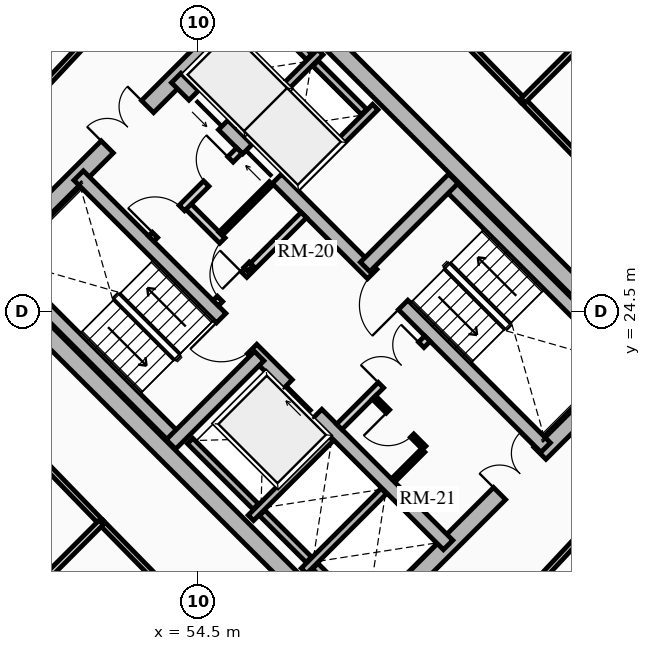
"""IFC4 building model, lengths in metres.
Left out: names, types, materials, properties, quantities, classifications, styles, units other than length and angle.
Written with IfcOpenShell. Run it as: python <this file> out.ifc"""

import sys

from ifc_helpers import new_model, si_unit, direction, frame, frame_2d, origin, place, context, subcontext, project, spatial, rectangle, extrude, source, transform, mapped, element, fill, save


model = new_model("IFC4")
c1 = context("Model", 3, precision=1e-05, world=origin(), true_north=direction((0.0, 1.0)))
c2 = subcontext(c1, "Body", "Model", "MODEL_VIEW")
j1 = project(units=[si_unit("LENGTHUNIT", "METRE"), si_unit("PLANEANGLEUNIT", "RADIAN")], contexts=[c1])
p1 = place(None, origin())
s1 = spatial("IfcSite", under=j1, at=p1, CompositionType="ELEMENT")
p2 = place(p1, origin())
s2 = spatial("IfcBuilding", under=s1, at=p2, CompositionType="ELEMENT")
p3 = place(p2, frame((0.0, 0.0, 90.52)))
s3 = spatial("IfcBuildingStorey", under=s2, at=p3, CompositionType="ELEMENT", Elevation=90.52)
for number, where, z_axis, x_axis in (
    (1, (58.737, 15.697, 0.0), (0.0, 0.0, 1.0), (-0.707, 0.707, 0.0)),
    (2, (66.303, 23.263, 0.0), (0.0, 0.0, 1.0), (-0.707, 0.707, 0.0)),
):
    element("IfcWall", number, at=place(p3, frame(where, z_axis=z_axis, x_axis=x_axis)), inside=s3, PredefinedType="SHEAR", context=c2, shape_type="SweptSolid", body=[
        extrude(rectangle(XDim=14.2, YDim=0.45, at=frame_2d((7.1, 0.0))), origin(), (0.0, 0.0, 1.0), 2.91),
    ])
p4 = place(p3, frame((58.578, 15.856, 0.0), z_axis=(0.0, 0.0, 1.0), x_axis=(0.707106781187, 0.707106781187, 0.0)))
e3 = element("IfcWall", 3, at=p4, inside=s3, PredefinedType="SHEAR", context=c2, shape_type="SweptSolid", body=[
    extrude(rectangle(XDim=10.7, YDim=0.45, at=frame_2d((5.35, 0.0))), origin(), (0.0, 0.0, 1.0), 2.91),
])
m1 = source(origin(), c2, "Body", "SweptSolid", [
    extrude(rectangle(XDim=1.5, YDim=2.02, at=frame_2d((0.75, 1.01))), frame((0.0, 0.235, 0.0), z_axis=(0.0, -1.0, 0.0), x_axis=(1.0, 0.0, 0.0)), (0.0, 0.0, 1.0), 0.47),
])
p5 = place(p4, frame((5.45, 0.0, 0.0)))
e4 = element("IfcOpeningElement", 4, at=p5, cuts=e3, PredefinedType="OPENING", context=c2, shape_type="MappedRepresentation", body=[
    mapped(m1, transform((0.0, 0.0, 0.0), x_axis=(1.0, 0.0, 0.0), y_axis=(0.0, 1.0, 0.0), z_axis=(0.0, 0.0, 1.0), scale=1.0)),
])
p6 = place(p3, frame((48.856, 25.578, 0.0), z_axis=(0.0, 0.0, 1.0), x_axis=(0.707106781187, 0.707106781187, 0.0)))
e5 = element("IfcWall", 5, at=p6, inside=s3, PredefinedType="SHEAR", context=c2, shape_type="SweptSolid", body=[
    extrude(rectangle(XDim=10.7, YDim=0.45, at=frame_2d((5.35, 0.0))), origin(), (0.0, 0.0, 1.0), 2.91),
])
p7 = place(p6, frame((4.6, 0.0, 0.0)))
e6 = element("IfcOpeningElement", 6, at=p7, cuts=e5, PredefinedType="OPENING", context=c2, shape_type="MappedRepresentation", body=[
    mapped(m1, transform((0.0, 0.0, 0.0), x_axis=(1.0, 0.0, 0.0), y_axis=(0.0, 1.0, 0.0), z_axis=(0.0, 0.0, 1.0), scale=1.0)),
])
p8 = place(p3, frame((61.078, 18.355, 0.0), z_axis=(0.0, 0.0, 1.0), x_axis=(-0.707106781187, 0.707106781187, 0.0)))
e7 = element("IfcWall", 7, at=p8, inside=s3, PredefinedType="SHEAR", context=c2, shape_type="SweptSolid", body=[
    extrude(rectangle(XDim=13.75, YDim=0.35, at=frame_2d((6.875, 0.0))), origin(), (0.0, 0.0, 1.0), 2.91),
])
m2 = source(origin(), c2, "Body", "SweptSolid", [
    extrude(rectangle(XDim=1.1, YDim=2.015, at=frame_2d((0.55, 1.007))), frame((0.0, 0.185, 0.0), z_axis=(0.0, -1.0, 0.0), x_axis=(1.0, 0.0, 0.0)), (0.0, 0.0, 1.0), 0.37),
])
p9 = place(p8, frame((4.875, 0.0, 0.0)))
e8 = element("IfcOpeningElement", 8, at=p9, cuts=e7, PredefinedType="OPENING", context=c2, shape_type="MappedRepresentation", body=[
    mapped(m2, transform((0.0, 0.0, 0.0), x_axis=(1.0, 0.0, 0.0), y_axis=(0.0, 1.0, 0.0), z_axis=(0.0, 0.0, 1.0), scale=1.0)),
])
m3 = source(origin(), c2, "Body", "SweptSolid", [
    extrude(rectangle(XDim=1.15, YDim=2.02, at=frame_2d((0.575, 1.01))), frame((0.0, 0.185, 0.0), z_axis=(0.0, -1.0, 0.0), x_axis=(1.0, 0.0, 0.0)), (0.0, 0.0, 1.0), 0.37),
])
p10 = place(p8, frame((7.295, 0.0, 0.0)))
e9 = element("IfcOpeningElement", 9, at=p10, cuts=e7, PredefinedType="OPENING", context=c2, shape_type="MappedRepresentation", body=[
    mapped(m3, transform((0.0, 0.0, 0.0), x_axis=(1.0, 0.0, 0.0), y_axis=(0.0, 1.0, 0.0), z_axis=(0.0, 0.0, 1.0), scale=1.0)),
])
p11 = place(p3, frame((63.645, 20.922, 0.0), z_axis=(0.0, 0.0, 1.0), x_axis=(-0.707106781187, 0.707106781187, 0.0)))
e10 = element("IfcWall", 10, at=p11, inside=s3, PredefinedType="SHEAR", context=c2, shape_type="SweptSolid", body=[
    extrude(rectangle(XDim=13.75, YDim=0.35, at=frame_2d((6.875, 0.0))), origin(), (0.0, 0.0, 1.0), 2.91),
])
p12 = place(p11, frame((10.0, 0.0, 0.0)))
e11 = element("IfcOpeningElement", 11, at=p12, cuts=e10, PredefinedType="OPENING", context=c2, shape_type="MappedRepresentation", body=[
    mapped(m2, transform((0.0, 0.0, 0.0), x_axis=(1.0, 0.0, 0.0), y_axis=(0.0, 1.0, 0.0), z_axis=(0.0, 0.0, 1.0), scale=1.0)),
])
p13 = place(p11, frame((12.0, 0.0, 0.0)))
e12 = element("IfcOpeningElement", 12, at=p13, cuts=e10, PredefinedType="OPENING", context=c2, shape_type="MappedRepresentation", body=[
    mapped(m2, transform((0.0, 0.0, 0.0), x_axis=(1.0, 0.0, 0.0), y_axis=(0.0, 1.0, 0.0), z_axis=(0.0, 0.0, 1.0), scale=1.0)),
])
p14 = place(p11, frame((5.305, 0.0, 0.0)))
e13 = element("IfcOpeningElement", 13, at=p14, cuts=e10, PredefinedType="OPENING", context=c2, shape_type="MappedRepresentation", body=[
    mapped(m3, transform((0.0, 0.0, 0.0), x_axis=(1.0, 0.0, 0.0), y_axis=(0.0, 1.0, 0.0), z_axis=(0.0, 0.0, 1.0), scale=1.0)),
])
p15 = place(p3, frame((53.922, 21.141, 0.0), z_axis=(0.0, 0.0, 1.0), x_axis=(-0.707088616009, 0.707124945897, 0.0)))
e14 = element("IfcWall", 14, at=p15, inside=s3, PredefinedType="SHEAR", context=c2, shape_type="SweptSolid", body=[
    extrude(rectangle(XDim=6.72, YDim=0.35, at=frame_2d((3.36, 0.0))), origin(), (0.0, 0.0, 1.0), 2.91),
])
p16 = place(p3, frame((53.784, 21.003, 0.0), z_axis=(0.0, 0.0, 1.0), x_axis=(0.707106781187, 0.707106781187, 0.0)))
e15 = element("IfcWall", 15, at=p16, inside=s3, PredefinedType="SHEAR", context=c2, shape_type="SweptSolid", body=[
    extrude(rectangle(XDim=3.285, YDim=0.35, at=frame_2d((1.643, 0.0))), origin(), (0.0, 0.0, 1.0), 2.91),
])
p17 = place(p3, frame((65.83, 23.107, 0.0), z_axis=(0.0, 0.0, 1.0), x_axis=(-0.707088616009, 0.707124945897, 0.0)))
e16 = element("IfcWall", 16, at=p17, inside=s3, PredefinedType="SHEAR", context=c2, shape_type="SweptSolid", body=[
    extrude(rectangle(XDim=6.72, YDim=0.35, at=frame_2d((3.36, 0.0))), origin(), (0.0, 0.0, 1.0), 2.91),
])
p18 = place(p3, frame((58.893, 25.674, 0.0), z_axis=(0.0, 0.0, 1.0), x_axis=(0.707106781187, 0.707106781187, 0.0)))
e17 = element("IfcWall", 17, at=p18, inside=s3, PredefinedType="SHEAR", context=c2, shape_type="SweptSolid", body=[
    extrude(rectangle(XDim=3.285, YDim=0.35, at=frame_2d((1.643, 0.0))), origin(), (0.0, 0.0, 1.0), 2.91),
])
p19 = place(p3, frame((55.888, 19.069, 0.0), z_axis=(0.0, 0.0, 1.0), x_axis=(0.707106781187, 0.707106781187, 0.0)))
e18 = element("IfcWall", 18, at=p19, inside=s3, PredefinedType="SHEAR", context=c2, shape_type="SweptSolid", body=[
    extrude(rectangle(XDim=2.97, YDim=0.2, at=frame_2d((1.485, 0.0))), origin(), (0.0, 0.0, 1.0), 2.91),
])
p20 = place(p3, frame((56.015, 19.366, 0.0), z_axis=(0.0, 0.0, 1.0), x_axis=(-0.707106781187, 0.707106781187, 0.0)))
e19 = element("IfcWall", 19, at=p20, inside=s3, PredefinedType="SHEAR", context=c2, shape_type="SweptSolid", body=[
    extrude(rectangle(XDim=2.44, YDim=0.2, at=frame_2d((1.22, 0.0))), origin(), (0.0, 0.0, 1.0), 2.91),
])
p21 = place(p3, frame((57.284, 17.673, 0.0), z_axis=(0.0, 0.0, 1.0), x_axis=(0.707147878904, 0.70706568108, 0.0)))
e20 = element("IfcWall", 20, at=p21, inside=s3, PredefinedType="SHEAR", context=c2, shape_type="SweptSolid", body=[
    extrude(rectangle(XDim=2.97, YDim=0.2, at=frame_2d((1.485, 0.0))), origin(), (0.0, 0.0, 1.0), 2.91),
])
p22 = place(p3, frame((57.412, 17.97, 0.0), z_axis=(0.0, 0.0, 1.0), x_axis=(-0.707106781187, 0.707106781187, 0.0)))
e21 = element("IfcWall", 21, at=p22, inside=s3, PredefinedType="SHEAR", context=c2, shape_type="SweptSolid", body=[
    extrude(rectangle(XDim=1.735, YDim=0.2, at=frame_2d((0.867, 0.0))), origin(), (0.0, 0.0, 1.0), 2.91),
])
p23 = place(p3, frame((58.737, 16.644, 0.0), z_axis=(0.0, 0.0, 1.0), x_axis=(-0.707032117043, 0.707181437447, 0.0)))
e22 = element("IfcWall", 22, at=p23, inside=s3, PredefinedType="SHEAR", context=c2, shape_type="SweptSolid", body=[
    extrude(rectangle(XDim=1.635, YDim=0.2, at=frame_2d((0.817, 0.0))), origin(), (0.0, 0.0, 1.0), 2.91),
])
p24 = place(p3, frame((57.062, 27.781, 0.0), z_axis=(0.0, 0.0, 1.0), x_axis=(0.707106781187, 0.707106781187, 0.0)))
e23 = element("IfcWall", 23, at=p24, inside=s3, PredefinedType="SHEAR", context=c2, shape_type="SweptSolid", body=[
    extrude(rectangle(XDim=2.97, YDim=0.2, at=frame_2d((1.485, 0.0))), origin(), (0.0, 0.0, 1.0), 2.91),
])
p25 = place(p3, frame((55.615, 29.227, 0.0), z_axis=(0.0, 0.0, 1.0), x_axis=(0.707147878904, 0.70706568108, 0.0)))
e24 = element("IfcWall", 24, at=p25, inside=s3, PredefinedType="SHEAR", context=c2, shape_type="SweptSolid", body=[
    extrude(rectangle(XDim=2.97, YDim=0.2, at=frame_2d((1.485, 0.0))), origin(), (0.0, 0.0, 1.0), 2.91),
])
p26 = place(p3, frame((58.865, 29.754, 0.0), z_axis=(0.0, 0.0, 1.0), x_axis=(-0.707174411312, 0.707039144592, 0.0)))
e25 = element("IfcWall", 25, at=p26, inside=s3, PredefinedType="SHEAR", context=c2, shape_type="SweptSolid", body=[
    extrude(rectangle(XDim=1.805, YDim=0.2, at=frame_2d((0.902, 0.0))), origin(), (0.0, 0.0, 1.0), 2.91),
])
p27 = place(p3, frame((57.419, 31.2, 0.0), z_axis=(0.0, 0.0, 1.0), x_axis=(-0.707032117043, 0.707181437447, 0.0)))
e26 = element("IfcWall", 26, at=p27, inside=s3, PredefinedType="SHEAR", context=c2, shape_type="SweptSolid", body=[
    extrude(rectangle(XDim=1.635, YDim=0.2, at=frame_2d((0.817, 0.0))), origin(), (0.0, 0.0, 1.0), 2.91),
])
p28 = place(p3, frame((58.214, 21.467, 0.0), z_axis=(0.0, 0.0, 1.0), x_axis=(0.707106781187, 0.707106781187, 0.0)))
e27 = element("IfcWall", 27, at=p28, inside=s3, PredefinedType="PARTITIONING", context=c2, shape_type="SweptSolid", body=[
    extrude(rectangle(XDim=3.28, YDim=0.2, at=frame_2d((1.64, 0.0))), origin(), (0.0, 0.0, 1.0), 2.655),
])
m4 = source(origin(), c2, "Body", "SweptSolid", [
    extrude(rectangle(XDim=1.5, YDim=2.02, at=frame_2d((0.75, 1.01))), frame((0.0, 0.11, 0.0), z_axis=(0.0, -1.0, 0.0), x_axis=(1.0, 0.0, 0.0)), (0.0, 0.0, 1.0), 0.22),
])
p29 = place(p28, frame((1.55, 0.0, 0.0)))
e28 = element("IfcOpeningElement", 28, at=p29, cuts=e27, PredefinedType="OPENING", context=c2, shape_type="MappedRepresentation", body=[
    mapped(m4, transform((0.0, 0.0, 0.0), x_axis=(1.0, 0.0, 0.0), y_axis=(0.0, 1.0, 0.0), z_axis=(0.0, 0.0, 1.0), scale=1.0)),
])
p30 = place(p3, frame((54.961, 24.719, 0.0), z_axis=(0.0, 0.0, 1.0), x_axis=(0.707106781187, 0.707106781187, 0.0)))
e29 = element("IfcWall", 29, at=p30, inside=s3, PredefinedType="PARTITIONING", context=c2, shape_type="SweptSolid", body=[
    extrude(rectangle(XDim=3.28, YDim=0.2, at=frame_2d((1.64, 0.0))), origin(), (0.0, 0.0, 1.0), 2.655),
])
m5 = source(origin(), c2, "Body", "SweptSolid", [
    extrude(rectangle(XDim=0.9, YDim=2.005, at=frame_2d((0.45, 1.002))), frame((0.0, 0.11, 0.0), z_axis=(0.0, -1.0, 0.0), x_axis=(1.0, 0.0, 0.0)), (0.0, 0.0, 1.0), 0.22),
])
p31 = place(p30, frame((0.16, 0.0, 0.0)))
e30 = element("IfcOpeningElement", 30, at=p31, cuts=e29, PredefinedType="OPENING", context=c2, shape_type="MappedRepresentation", body=[
    mapped(m5, transform((0.0, 0.0, 0.0), x_axis=(1.0, 0.0, 0.0), y_axis=(0.0, 1.0, 0.0), z_axis=(0.0, 0.0, 1.0), scale=1.0)),
])
p32 = place(p3, frame((55.874, 25.631, 0.0), z_axis=(0.0, 0.0, 1.0), x_axis=(-0.707157639372, 0.707055919343, 0.0)))
e31 = element("IfcWall", 31, at=p32, inside=s3, PredefinedType="PARTITIONING", context=c2, shape_type="SweptSolid", body=[
    extrude(rectangle(XDim=2.4, YDim=0.2, at=frame_2d((1.2, 0.0))), origin(), (0.0, 0.0, 1.0), 2.655),
])
p33 = place(p32, frame((0.14, 0.0, 0.0)))
e32 = element("IfcOpeningElement", 32, at=p33, cuts=e31, PredefinedType="OPENING", context=c2, shape_type="MappedRepresentation", body=[
    mapped(m5, transform((0.0, 0.0, 0.0), x_axis=(1.0, 0.0, 0.0), y_axis=(0.0, 1.0, 0.0), z_axis=(0.0, 0.0, 1.0), scale=1.0)),
])
p34 = place(p3, frame((53.264, 26.416, 0.0), z_axis=(0.0, 0.0, 1.0), x_axis=(0.707106781187, 0.707106781187, 0.0)))
e33 = element("IfcWall", 33, at=p34, inside=s3, PredefinedType="PARTITIONING", context=c2, shape_type="SweptSolid", body=[
    extrude(rectangle(XDim=3.28, YDim=0.2, at=frame_2d((1.64, 0.0))), origin(), (0.0, 0.0, 1.0), 2.655),
])
m6 = source(origin(), c2, "Body", "SweptSolid", [
    extrude(rectangle(XDim=1.0, YDim=2.015, at=frame_2d((0.5, 1.007))), frame((0.0, 0.11, 0.0), z_axis=(0.0, -1.0, 0.0), x_axis=(1.0, 0.0, 0.0)), (0.0, 0.0, 1.0), 0.22),
])
p35 = place(p34, frame((0.14, 0.0, 0.0)))
e34 = element("IfcOpeningElement", 34, at=p35, cuts=e33, PredefinedType="OPENING", context=c2, shape_type="MappedRepresentation", body=[
    mapped(m6, transform((0.0, 0.0, 0.0), x_axis=(1.0, 0.0, 0.0), y_axis=(0.0, 1.0, 0.0), z_axis=(0.0, 0.0, 1.0), scale=1.0)),
])
p36 = place(p34, frame((2.05, 0.0, 0.0)))
e35 = element("IfcOpeningElement", 35, at=p36, cuts=e33, PredefinedType="OPENING", context=c2, shape_type="MappedRepresentation", body=[
    mapped(m5, transform((0.0, 0.0, 0.0), x_axis=(1.0, 0.0, 0.0), y_axis=(0.0, 1.0, 0.0), z_axis=(0.0, 0.0, 1.0), scale=1.0)),
])
p37 = place(p3, frame((60.448, 20.915, 0.0), z_axis=(0.0, 0.0, 1.0), x_axis=(-0.707106781187, 0.707106781187, 0.0)))
e36 = element("IfcWall", 36, at=p37, inside=s3, PredefinedType="PARTITIONING", context=c2, shape_type="SweptSolid", body=[
    extrude(rectangle(XDim=1.87, YDim=0.125, at=frame_2d((0.935, 0.0))), origin(), (0.0, 0.0, 1.0), 2.655),
])
m7 = source(origin(), c2, "Body", "SweptSolid", [
    extrude(rectangle(XDim=0.9, YDim=2.005, at=frame_2d((0.45, 1.002))), frame((0.0, 0.073, 0.0), z_axis=(0.0, -1.0, 0.0), x_axis=(1.0, 0.0, 0.0)), (0.0, 0.0, 1.0), 0.145),
])
p38 = place(p37, frame((0.45, 0.0, 0.0)))
e37 = element("IfcOpeningElement", 37, at=p38, cuts=e36, PredefinedType="OPENING", context=c2, shape_type="MappedRepresentation", body=[
    mapped(m7, transform((0.0, 0.0, 0.0), x_axis=(1.0, 0.0, 0.0), y_axis=(0.0, 1.0, 0.0), z_axis=(0.0, 0.0, 1.0), scale=1.0)),
])
p39 = place(p3, frame((59.643, 20.066, 0.0), z_axis=(0.0, 0.0, 1.0), x_axis=(0.707106781187, 0.707106781187, 0.0)))
e38 = element("IfcWall", 38, at=p39, inside=s3, PredefinedType="PARTITIONING", context=c2, shape_type="SweptSolid", body=[
    extrude(rectangle(XDim=1.1, YDim=0.125, at=frame_2d((0.55, 0.0))), origin(), (0.0, 0.0, 1.0), 2.655),
])
p40 = place(p3, frame((55.089, 26.543, 0.0), z_axis=(0.0, 0.0, 1.0), x_axis=(0.707106781187, 0.707106781187, 0.0)))
e39 = element("IfcWall", 39, at=p40, inside=s3, PredefinedType="PARTITIONING", context=c2, shape_type="SweptSolid", body=[
    extrude(rectangle(XDim=1.88, YDim=0.125, at=frame_2d((0.94, 0.0))), origin(), (0.0, 0.0, 1.0), 2.655),
])
p41 = place(p3, frame((63.051, 30.051, 0.0), z_axis=(0.0, 0.0, 1.0), x_axis=(-0.698846622234, 0.715271555839, 0.0)))
e40 = element("IfcWall", 40, at=p41, inside=s3, PredefinedType="PARTITIONING", context=c2, shape_type="SweptSolid", body=[
    extrude(rectangle(XDim=6.05, YDim=0.15, at=frame_2d((3.025, 0.0))), origin(), (0.0, 0.0, 1.0), 2.225),
])
p42 = place(p3, frame((52.107, 32.202, 0.0), z_axis=(0.0, 0.0, 1.0), x_axis=(-0.682605209028, -0.730787334734, 0.0)))
e41 = element("IfcWall", 41, at=p42, inside=s3, PredefinedType="PARTITIONING", context=c2, shape_type="SweptSolid", body=[
    extrude(rectangle(XDim=6.486, YDim=0.15, at=frame_2d((3.243, 0.0))), origin(), (0.0, 0.0, 1.0), 2.225),
])
p43 = place(p3, frame((47.786, 23.242, 0.0), z_axis=(0.0, 0.0, 1.0), x_axis=(0.696183456981, -0.717863910659, 0.0)))
e42 = element("IfcWall", 42, at=p43, inside=s3, PredefinedType="PARTITIONING", context=c2, shape_type="SweptSolid", body=[
    extrude(rectangle(XDim=5.979, YDim=0.15, at=frame_2d((2.99, 0.0))), origin(), (0.0, 0.0, 1.0), 2.655),
])
p44 = place(p3, frame((51.949, 18.949, 0.0), z_axis=(0.0, 0.0, 1.0), x_axis=(0.699801520154, -0.714337337951, 0.0)))
e43 = element("IfcWall", 43, at=p44, inside=s3, PredefinedType="PARTITIONING", context=c2, shape_type="SweptSolid", body=[
    extrude(rectangle(XDim=6.097, YDim=0.15, at=frame_2d((3.048, 0.0))), origin(), (0.0, 0.0, 1.0), 2.225),
])
p45 = place(p3, frame((62.839, 16.745, 0.0), z_axis=(0.0, 0.0, 1.0), x_axis=(0.682386779427, 0.73099130177, 0.0)))
e44 = element("IfcWall", 44, at=p45, inside=s3, PredefinedType="PARTITIONING", context=c2, shape_type="SweptSolid", body=[
    extrude(rectangle(XDim=6.6, YDim=0.15, at=frame_2d((3.3, 0.0))), origin(), (0.0, 0.0, 1.0), 2.225),
])
p46 = place(p3, frame((67.19, 25.791, 0.0), z_axis=(0.0, 0.0, 1.0), x_axis=(-0.696839457851, 0.717227139742, 0.0)))
e45 = element("IfcWall", 45, at=p46, inside=s3, PredefinedType="PARTITIONING", context=c2, shape_type="SweptSolid", body=[
    extrude(rectangle(XDim=5.939, YDim=0.15, at=frame_2d((2.97, 0.0))), origin(), (0.0, 0.0, 1.0), 2.655),
])
for number, where, z_axis, x_axis in (
    (46, (63.051, 30.051, 0.0), (0.0, 0.0, 1.0), (0.707, 0.707, 0.0)),
    (47, (51.949, 18.949, 0.0), (0.0, 0.0, 1.0), (-0.707, -0.707, 0.0)),
):
    element("IfcWall", number, at=place(p3, frame(where, z_axis=z_axis, x_axis=x_axis)), inside=s3, PredefinedType="PARTITIONING", context=c2, shape_type="SweptSolid", body=[
        extrude(rectangle(XDim=7.711, YDim=0.16, at=frame_2d((3.855, 0.0))), origin(), (0.0, 0.0, 1.0), 2.179),
    ])
m8 = source(origin(), c2, "Body", "SweptSolid", [
    extrude(rectangle(XDim=1.1, YDim=2.015, at=frame_2d((0.55, 1.007))), frame((0.0, 0.025, 0.0), z_axis=(0.0, -1.0, 0.0), x_axis=(1.0, 0.0, 0.0)), (0.0, 0.0, 1.0), 0.05),
])
p47 = place(p9, origin())
e48 = element("IfcDoor", 48, at=p47, inside=s3, OperationType="SLIDING_TO_RIGHT", PredefinedType="DOOR", context=c2, shape_type="MappedRepresentation", body=[
    mapped(m8, transform((0.0, 0.0, 0.0), x_axis=(1.0, 0.0, 0.0), y_axis=(0.0, 1.0, 0.0), z_axis=(0.0, 0.0, 1.0), scale=1.0)),
])
fill(e8, e48)
p48 = place(p12, origin())
e49 = element("IfcDoor", 49, at=p48, inside=s3, OperationType="SLIDING_TO_RIGHT", PredefinedType="DOOR", context=c2, shape_type="MappedRepresentation", body=[
    mapped(m8, transform((0.0, 0.0, 0.0), x_axis=(1.0, 0.0, 0.0), y_axis=(0.0, 1.0, 0.0), z_axis=(0.0, 0.0, 1.0), scale=1.0)),
])
fill(e11, e49)
p49 = place(p13, origin())
e50 = element("IfcDoor", 50, at=p49, inside=s3, OperationType="SLIDING_TO_LEFT", PredefinedType="DOOR", context=c2, shape_type="MappedRepresentation", body=[
    mapped(m8, transform((0.0, 0.0, 0.0), x_axis=(1.0, 0.0, 0.0), y_axis=(0.0, 1.0, 0.0), z_axis=(0.0, 0.0, 1.0), scale=1.0)),
])
fill(e12, e50)
m9 = source(origin(), c2, "Body", "SweptSolid", [
    extrude(rectangle(XDim=1.15, YDim=2.02, at=frame_2d((0.575, 1.01))), frame((0.0, 0.025, 0.0), z_axis=(0.0, -1.0, 0.0), x_axis=(1.0, 0.0, 0.0)), (0.0, 0.0, 1.0), 0.05),
])
p50 = place(p10, origin())
e51 = element("IfcDoor", 51, at=p50, inside=s3, OperationType="SINGLE_SWING_RIGHT", PredefinedType="DOOR", context=c2, shape_type="MappedRepresentation", body=[
    mapped(m9, transform((0.0, 0.0, 0.0), x_axis=(1.0, 0.0, 0.0), y_axis=(0.0, 1.0, 0.0), z_axis=(0.0, 0.0, 1.0), scale=1.0)),
])
fill(e9, e51)
p51 = place(p14, origin())
e52 = element("IfcDoor", 52, at=p51, inside=s3, OperationType="SINGLE_SWING_LEFT", PredefinedType="DOOR", context=c2, shape_type="MappedRepresentation", body=[
    mapped(m9, transform((0.0, 0.0, 0.0), x_axis=(1.0, 0.0, 0.0), y_axis=(0.0, 1.0, 0.0), z_axis=(0.0, 0.0, 1.0), scale=1.0)),
])
fill(e13, e52)
m10 = source(origin(), c2, "Body", "SweptSolid", [
    extrude(rectangle(XDim=1.5, YDim=2.02, at=frame_2d((0.75, 1.01))), frame((0.0, 0.025, 0.0), z_axis=(0.0, -1.0, 0.0), x_axis=(1.0, 0.0, 0.0)), (0.0, 0.0, 1.0), 0.05),
])
p52 = place(p7, origin())
e53 = element("IfcDoor", 53, at=p52, inside=s3, OperationType="DOUBLE_DOOR_SINGLE_SWING", PredefinedType="DOOR", context=c2, shape_type="MappedRepresentation", body=[
    mapped(m10, transform((0.0, 0.0, 0.0), x_axis=(1.0, 0.0, 0.0), y_axis=(0.0, 1.0, 0.0), z_axis=(0.0, 0.0, 1.0), scale=1.0)),
])
fill(e6, e53)
p53 = place(p5, origin())
e54 = element("IfcDoor", 54, at=p53, inside=s3, OperationType="DOUBLE_DOOR_SINGLE_SWING", PredefinedType="DOOR", context=c2, shape_type="MappedRepresentation", body=[
    mapped(m10, transform((0.0, 0.0, 0.0), x_axis=(1.0, 0.0, 0.0), y_axis=(0.0, 1.0, 0.0), z_axis=(0.0, 0.0, 1.0), scale=1.0)),
])
fill(e4, e54)
p54 = place(p29, origin())
e55 = element("IfcDoor", 55, at=p54, inside=s3, OperationType="DOUBLE_DOOR_SINGLE_SWING", PredefinedType="DOOR", context=c2, shape_type="MappedRepresentation", body=[
    mapped(m10, transform((0.0, 0.0, 0.0), x_axis=(1.0, 0.0, 0.0), y_axis=(0.0, 1.0, 0.0), z_axis=(0.0, 0.0, 1.0), scale=1.0)),
])
fill(e28, e55)
m11 = source(origin(), c2, "Body", "SweptSolid", [
    extrude(rectangle(XDim=0.9, YDim=2.005, at=frame_2d((0.45, 1.002))), frame((0.0, 0.025, 0.0), z_axis=(0.0, -1.0, 0.0), x_axis=(1.0, 0.0, 0.0)), (0.0, 0.0, 1.0), 0.05),
])
p55 = place(p31, origin())
e56 = element("IfcDoor", 56, at=p55, inside=s3, OperationType="SINGLE_SWING_RIGHT", PredefinedType="DOOR", context=c2, shape_type="MappedRepresentation", body=[
    mapped(m11, transform((0.0, 0.0, 0.0), x_axis=(1.0, 0.0, 0.0), y_axis=(0.0, 1.0, 0.0), z_axis=(0.0, 0.0, 1.0), scale=1.0)),
])
fill(e30, e56)
m12 = source(origin(), c2, "Body", "SweptSolid", [
    extrude(rectangle(XDim=1.0, YDim=2.015, at=frame_2d((0.5, 1.007))), frame((0.0, 0.025, 0.0), z_axis=(0.0, -1.0, 0.0), x_axis=(1.0, 0.0, 0.0)), (0.0, 0.0, 1.0), 0.05),
])
p56 = place(p35, origin())
e57 = element("IfcDoor", 57, at=p56, inside=s3, OperationType="SINGLE_SWING_LEFT", PredefinedType="DOOR", context=c2, shape_type="MappedRepresentation", body=[
    mapped(m12, transform((0.0, 0.0, 0.0), x_axis=(1.0, 0.0, 0.0), y_axis=(0.0, 1.0, 0.0), z_axis=(0.0, 0.0, 1.0), scale=1.0)),
])
fill(e34, e57)
p57 = place(p38, origin())
e58 = element("IfcDoor", 58, at=p57, inside=s3, OperationType="SINGLE_SWING_RIGHT", PredefinedType="DOOR", context=c2, shape_type="MappedRepresentation", body=[
    mapped(m11, transform((0.0, 0.0, 0.0), x_axis=(1.0, 0.0, 0.0), y_axis=(0.0, 1.0, 0.0), z_axis=(0.0, 0.0, 1.0), scale=1.0)),
])
fill(e37, e58)
p58 = place(p33, origin())
e59 = element("IfcDoor", 59, at=p58, inside=s3, OperationType="SINGLE_SWING_LEFT", PredefinedType="DOOR", context=c2, shape_type="MappedRepresentation", body=[
    mapped(m11, transform((0.0, 0.0, 0.0), x_axis=(1.0, 0.0, 0.0), y_axis=(0.0, 1.0, 0.0), z_axis=(0.0, 0.0, 1.0), scale=1.0)),
])
fill(e32, e59)
p59 = place(p36, origin())
e60 = element("IfcDoor", 60, at=p59, inside=s3, OperationType="SINGLE_SWING_RIGHT", PredefinedType="DOOR", context=c2, shape_type="MappedRepresentation", body=[
    mapped(m11, transform((0.0, 0.0, 0.0), x_axis=(1.0, 0.0, 0.0), y_axis=(0.0, 1.0, 0.0), z_axis=(0.0, 0.0, 1.0), scale=1.0)),
])
fill(e35, e60)
save(model, sys.argv[1])
